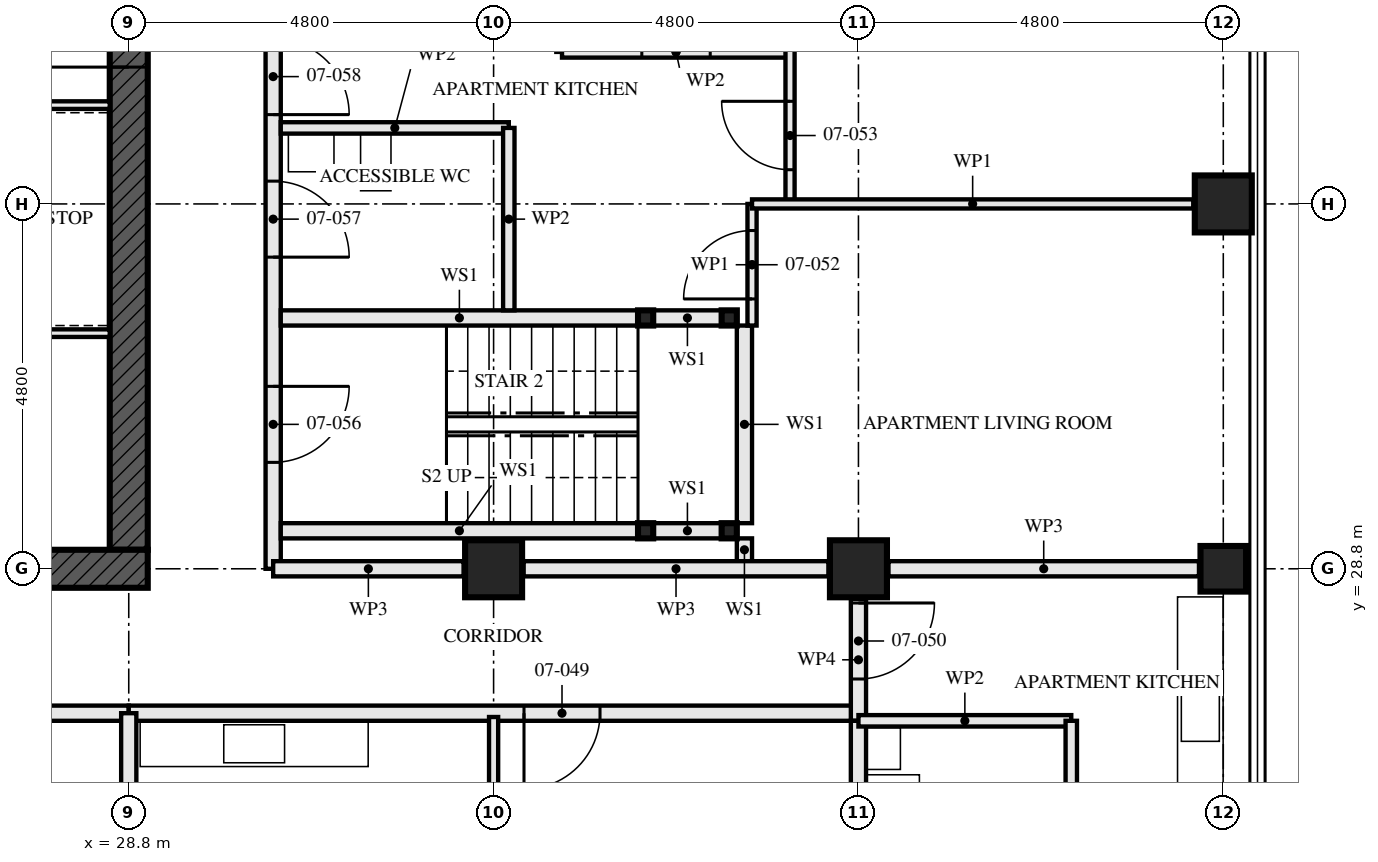
"""IFC4 building model, lengths in metres.
Left out: names, types, materials, properties, quantities, classifications, styles, units other than length and angle.
Written with IfcOpenShell. Run it as: python <this file> out.ifc"""

import sys

from ifc_helpers import new_model, si_unit, direction, frame, frame_2d, origin, origin_2d, place, context, subcontext, project, spatial, rectangle, hollow_rectangle, extrude, element, fill, save


model = new_model("IFC4")
c1 = context("Model", 3, precision=1e-05, world=origin(), true_north=direction((0.0, 1.0)))
c2 = subcontext(c1, "Body", "Model", "MODEL_VIEW")
j1 = project(units=[si_unit("LENGTHUNIT", "METRE"), si_unit("PLANEANGLEUNIT", "RADIAN")], contexts=[c1])
p1 = place(None, origin())
s1 = spatial("IfcSite", under=j1, at=p1, CompositionType="ELEMENT")
p2 = place(p1, origin())
s2 = spatial("IfcBuilding", under=s1, at=p2, CompositionType="ELEMENT")
p3 = place(p2, frame((0.0, 0.0, 30.5)))
s3 = spatial("IfcBuildingStorey", under=s2, at=p3, CompositionType="ELEMENT", Elevation=30.5)
for number, where, z_axis, x_axis in (
    (1, (33.6, 28.8, 0.0), (0.0, 0.0, 1.0), (0.0, 1.0, 0.0)),
    (2, (38.4, 28.8, 0.0), (0.0, 0.0, 1.0), (0.0, 1.0, 0.0)),
):
    element("IfcColumn", number, at=place(p3, frame(where, z_axis=z_axis, x_axis=x_axis)), inside=s3, PredefinedType="COLUMN", context=c2, shape_type="SweptSolid", body=[
        extrude(hollow_rectangle(XDim=0.75, YDim=0.75, WallThickness=0.08, at=origin_2d()), origin(), (0.0, 0.0, 1.0), 3.5),
    ])
p4 = place(p3, frame((43.2, 28.8, 0.0), z_axis=(0.0, 0.0, 1.0), x_axis=(0.0, 1.0, 0.0)))
e3 = element("IfcColumn", 3, at=p4, inside=s3, PredefinedType="COLUMN", context=c2, shape_type="SweptSolid", body=[
    extrude(hollow_rectangle(XDim=0.6, YDim=0.6, WallThickness=0.08, at=origin_2d()), origin(), (0.0, 0.0, 1.0), 3.5),
])
p5 = place(p3, frame((43.2, 33.6, 0.0), z_axis=(0.0, 0.0, 1.0), x_axis=(1.0, 0.0, 0.0)))
e4 = element("IfcColumn", 4, at=p5, inside=s3, PredefinedType="COLUMN", context=c2, shape_type="SweptSolid", body=[
    extrude(hollow_rectangle(XDim=0.75, YDim=0.75, WallThickness=0.08, at=origin_2d()), origin(), (0.0, 0.0, 1.0), 3.5),
])
p6 = place(p3, frame((14.15, 28.8, -0.17), z_axis=(0.0, 0.0, 1.0), x_axis=(1.0, 0.0, 0.0)))
e5 = element("IfcWall", 5, at=p6, inside=s3, PredefinedType="SHEAR", context=c2, shape_type="SweptSolid", body=[
    extrude(rectangle(XDim=14.9, YDim=0.5, at=frame_2d((7.45, 0.0))), origin(), (0.0, 0.0, 1.0), 3.5),
])
p7 = place(p6, frame((6.85, 0.0, 0.17)))
e6 = element("IfcOpeningElement", 6, at=p7, cuts=e5, PredefinedType="OPENING", context=c2, shape_type="SweptSolid", body=[
    extrude(rectangle(XDim=1.2, YDim=2.1, at=frame_2d((0.6, 1.05))), frame((0.0, 0.26, 0.0), z_axis=(0.0, -1.0, 0.0), x_axis=(1.0, 0.0, 0.0)), (0.0, 0.0, 1.0), 0.521),
])
p8 = place(p3, frame((28.8, 29.05, -0.17), z_axis=(0.0, 0.0, 1.0), x_axis=(0.0, 1.0, 0.0)))
e7 = element("IfcWall", 7, at=p8, inside=s3, PredefinedType="SHEAR", context=c2, shape_type="SweptSolid", body=[
    extrude(rectangle(XDim=13.9, YDim=0.5, at=frame_2d((6.95, 0.0))), origin(), (0.0, 0.0, 1.0), 3.5),
])
p9 = place(p8, frame((6.35, 0.0, 0.17)))
e8 = element("IfcOpeningElement", 8, at=p9, cuts=e7, PredefinedType="OPENING", context=c2, shape_type="SweptSolid", body=[
    extrude(rectangle(XDim=1.2, YDim=2.1, at=frame_2d((0.6, 1.05))), frame((0.0, 0.26, 0.0), z_axis=(0.0, -1.0, 0.0), x_axis=(1.0, 0.0, 0.0)), (0.0, 0.0, 1.0), 0.521),
])
for number, where, z_axis, x_axis in (
    (9, (36.7, 29.3, 0.0), (0.0, 0.0, 1.0), (1.0, 0.0, 0.0)),
    (10, (36.7, 32.1, 0.0), (0.0, 0.0, 1.0), (1.0, 0.0, 0.0)),
    (11, (35.6, 29.3, 0.0), (0.0, 0.0, 1.0), (1.0, 0.0, 0.0)),
    (12, (35.6, 32.1, 0.0), (0.0, 0.0, 1.0), (1.0, 0.0, 0.0)),
):
    element("IfcColumn", number, at=place(p3, frame(where, z_axis=z_axis, x_axis=x_axis)), inside=s3, PredefinedType="COLUMN", context=c2, shape_type="SweptSolid", body=[
        extrude(hollow_rectangle(XDim=0.2, YDim=0.2, WallThickness=0.008, at=origin_2d()), origin(), (0.0, 0.0, 1.0), 3.33),
    ])
p10 = place(p3, frame((14.4, 26.9, 0.0), z_axis=(0.0, 0.0, 1.0), x_axis=(1.0, 0.0, 0.0)))
e13 = element("IfcWall", 13, at=p10, inside=s3, PredefinedType="PARTITIONING", context=c2, shape_type="SweptSolid", body=[
    extrude(rectangle(XDim=14.4, YDim=0.2, at=frame_2d((7.2, 0.0))), origin(), (0.0, 0.0, 1.0), 2.55),
])
p11 = place(p10, frame((1.4, 0.0, 0.0)))
e14 = element("IfcOpeningElement", 14, at=p11, cuts=e13, PredefinedType="OPENING", context=c2, shape_type="SweptSolid", body=[
    extrude(rectangle(XDim=1.0, YDim=2.1, at=frame_2d((0.5, 1.05))), frame((0.0, 0.111, 0.0), z_axis=(0.0, -1.0, 0.0), x_axis=(1.0, 0.0, 0.0)), (0.0, 0.0, 1.0), 0.221),
])
p12 = place(p10, frame((5.2, 0.0, 0.0)))
e15 = element("IfcOpeningElement", 15, at=p12, cuts=e13, PredefinedType="OPENING", context=c2, shape_type="SweptSolid", body=[
    extrude(rectangle(XDim=1.0, YDim=2.1, at=frame_2d((0.5, 1.05))), frame((0.0, 0.111, 0.0), z_axis=(0.0, -1.0, 0.0), x_axis=(1.0, 0.0, 0.0)), (0.0, 0.0, 1.0), 0.221),
])
p13 = place(p10, frame((10.0, 0.0, 0.0)))
e16 = element("IfcOpeningElement", 16, at=p13, cuts=e13, PredefinedType="OPENING", context=c2, shape_type="SweptSolid", body=[
    extrude(rectangle(XDim=1.0, YDim=2.1, at=frame_2d((0.5, 1.05))), frame((0.0, 0.111, 0.0), z_axis=(0.0, -1.0, 0.0), x_axis=(1.0, 0.0, 0.0)), (0.0, 0.0, 1.0), 0.221),
])
p14 = place(p3, frame((33.6, 20.1, 0.0), z_axis=(0.0, 0.0, 1.0), x_axis=(0.0, 1.0, 0.0)))
e17 = element("IfcWall", 17, at=p14, inside=s3, PredefinedType="PARTITIONING", context=c2, shape_type="SweptSolid", body=[
    extrude(rectangle(XDim=6.75, YDim=0.12, at=frame_2d((3.375, 0.0))), origin(), (0.0, 0.0, 1.0), 2.55),
])
p15 = place(p14, frame((2.925, 0.0, 0.0)))
e18 = element("IfcOpeningElement", 18, at=p15, cuts=e17, PredefinedType="OPENING", context=c2, shape_type="SweptSolid", body=[
    extrude(rectangle(XDim=0.9, YDim=2.1, at=frame_2d((0.45, 1.05))), frame((0.0, 0.071, 0.0), z_axis=(0.0, -1.0, 0.0), x_axis=(1.0, 0.0, 0.0)), (0.0, 0.0, 1.0), 0.141),
])
p16 = place(p3, frame((38.4, 19.52, 0.0), z_axis=(0.0, 0.0, 1.0), x_axis=(0.0, 1.0, 0.0)))
e19 = element("IfcWall", 19, at=p16, inside=s3, PredefinedType="PARTITIONING", context=c2, shape_type="SweptSolid", body=[
    extrude(rectangle(XDim=7.28, YDim=0.2, at=frame_2d((3.64, 0.0))), origin(), (0.0, 0.0, 1.0), 2.55),
])
p17 = place(p3, frame((41.2, 23.8, 0.0), z_axis=(0.0, 0.0, 1.0), x_axis=(0.0, 1.0, 0.0)))
e20 = element("IfcWall", 20, at=p17, inside=s3, PredefinedType="PARTITIONING", context=c2, shape_type="SweptSolid", body=[
    extrude(rectangle(XDim=3.0, YDim=0.15, at=frame_2d((1.5, 0.0))), origin(), (0.0, 0.0, 1.0), 2.55),
])
p18 = place(p17, frame((1.05, 0.0, 0.0)))
e21 = element("IfcOpeningElement", 21, at=p18, cuts=e20, PredefinedType="OPENING", context=c2, shape_type="SweptSolid", body=[
    extrude(rectangle(XDim=0.9, YDim=2.1, at=frame_2d((0.45, 1.05))), frame((0.0, 0.085, 0.0), z_axis=(0.0, -1.0, 0.0), x_axis=(1.0, 0.0, 0.0)), (0.0, 0.0, 1.0), 0.171),
])
p19 = place(p3, frame((38.4, 26.8, 0.0), z_axis=(0.0, 0.0, 1.0), x_axis=(1.0, 0.0, 0.0)))
e22 = element("IfcWall", 22, at=p19, inside=s3, PredefinedType="PARTITIONING", context=c2, shape_type="SweptSolid", body=[
    extrude(rectangle(XDim=2.8, YDim=0.15, at=frame_2d((1.4, 0.0))), origin(), (0.0, 0.0, 1.0), 3.33),
])
p20 = place(p3, frame((28.8, 26.9, 0.0), z_axis=(0.0, 0.0, 1.0), x_axis=(1.0, 0.0, 0.0)))
e23 = element("IfcWall", 23, at=p20, inside=s3, PredefinedType="PARTITIONING", context=c2, shape_type="SweptSolid", body=[
    extrude(rectangle(XDim=9.6, YDim=0.2, at=frame_2d((4.8, 0.0))), origin(), (0.0, 0.0, 1.0), 3.33),
])
p21 = place(p20, frame((5.2, 0.0, 0.0)))
e24 = element("IfcOpeningElement", 24, at=p21, cuts=e23, PredefinedType="OPENING", context=c2, shape_type="SweptSolid", body=[
    extrude(rectangle(XDim=1.0, YDim=2.1, at=frame_2d((0.5, 1.05))), frame((0.0, 0.111, 0.0), z_axis=(0.0, -1.0, 0.0), x_axis=(1.0, 0.0, 0.0)), (0.0, 0.0, 1.0), 0.221),
])
p22 = place(p3, frame((38.4, 26.8, 0.0), z_axis=(0.0, 0.0, 1.0), x_axis=(0.0, 1.0, 0.0)))
e25 = element("IfcWall", 25, at=p22, inside=s3, PredefinedType="PARTITIONING", context=c2, shape_type="SweptSolid", body=[
    extrude(rectangle(XDim=1.605, YDim=0.2, at=frame_2d((0.802, 0.0))), origin(), (0.0, 0.0, 1.0), 3.33),
])
p23 = place(p22, frame((0.55, 0.0, 0.0)))
e26 = element("IfcOpeningElement", 26, at=p23, cuts=e25, PredefinedType="OPENING", context=c2, shape_type="SweptSolid", body=[
    extrude(rectangle(XDim=1.0, YDim=2.1, at=frame_2d((0.5, 1.05))), frame((0.0, 0.111, 0.0), z_axis=(0.0, -1.0, 0.0), x_axis=(1.0, 0.0, 0.0)), (0.0, 0.0, 1.0), 0.221),
])
p24 = place(p3, frame((36.6, 29.3, 0.0), z_axis=(0.0, 0.0, 1.0), x_axis=(-1.0, 0.0, 0.0)))
e27 = element("IfcWall", 27, at=p24, inside=s3, PredefinedType="SOLIDWALL", context=c2, shape_type="SweptSolid", body=[
    extrude(rectangle(XDim=0.9, YDim=0.2, at=frame_2d((0.45, 0.0))), origin(), (0.0, 0.0, 1.0), 2.99),
])
p25 = place(p3, frame((35.5, 29.3, 0.0), z_axis=(0.0, 0.0, 1.0), x_axis=(-1.0, 0.0, 0.0)))
e28 = element("IfcWall", 28, at=p25, inside=s3, PredefinedType="SOLIDWALL", context=c2, shape_type="SweptSolid", body=[
    extrude(rectangle(XDim=4.7, YDim=0.2, at=frame_2d((2.35, 0.0))), origin(), (0.0, 0.0, 1.0), 2.99),
])
p26 = place(p3, frame((36.6, 32.1, 0.0), z_axis=(0.0, 0.0, 1.0), x_axis=(-1.0, 0.0, 0.0)))
e29 = element("IfcWall", 29, at=p26, inside=s3, PredefinedType="SOLIDWALL", context=c2, shape_type="SweptSolid", body=[
    extrude(rectangle(XDim=0.9, YDim=0.2, at=frame_2d((0.45, 0.0))), origin(), (0.0, 0.0, 1.0), 2.99),
])
p27 = place(p3, frame((35.5, 32.1, 0.0), z_axis=(0.0, 0.0, 1.0), x_axis=(-1.0, 0.0, 0.0)))
e30 = element("IfcWall", 30, at=p27, inside=s3, PredefinedType="SOLIDWALL", context=c2, shape_type="SweptSolid", body=[
    extrude(rectangle(XDim=4.7, YDim=0.2, at=frame_2d((2.35, 0.0))), origin(), (0.0, 0.0, 1.0), 2.99),
])
p28 = place(p3, frame((36.9, 28.9, 0.0), z_axis=(0.0, 0.0, 1.0), x_axis=(0.0, 1.0, 0.0)))
e31 = element("IfcWall", 31, at=p28, inside=s3, PredefinedType="SOLIDWALL", context=c2, shape_type="SweptSolid", body=[
    extrude(rectangle(XDim=0.3, YDim=0.2, at=frame_2d((0.15, 0.0))), origin(), (0.0, 0.0, 1.0), 3.33),
])
p29 = place(p3, frame((36.9, 29.4, 0.0), z_axis=(0.0, 0.0, 1.0), x_axis=(0.0, 1.0, 0.0)))
e32 = element("IfcWall", 32, at=p29, inside=s3, PredefinedType="SOLIDWALL", context=c2, shape_type="SweptSolid", body=[
    extrude(rectangle(XDim=2.6, YDim=0.2, at=frame_2d((1.3, 0.0))), origin(), (0.0, 0.0, 1.0), 3.33),
])
p30 = place(p3, frame((33.8, 32.2, 0.0), z_axis=(0.0, 0.0, 1.0), x_axis=(0.0, 1.0, 0.0)))
e33 = element("IfcWall", 33, at=p30, inside=s3, PredefinedType="PARTITIONING", context=c2, shape_type="SweptSolid", body=[
    extrude(rectangle(XDim=2.4, YDim=0.15, at=frame_2d((1.2, 0.0))), origin(), (0.0, 0.0, 1.0), 2.55),
])
p31 = place(p3, frame((33.8, 34.6, 0.0), z_axis=(0.0, 0.0, 1.0), x_axis=(-1.0, 0.0, 0.0)))
e34 = element("IfcWall", 34, at=p31, inside=s3, PredefinedType="PARTITIONING", context=c2, shape_type="SweptSolid", body=[
    extrude(rectangle(XDim=3.0, YDim=0.15, at=frame_2d((1.5, 0.0))), origin(), (0.0, 0.0, 1.0), 3.33),
])
p32 = place(p3, frame((37.5, 35.6, 0.0), z_axis=(0.0, 0.0, 1.0), x_axis=(-1.0, 0.0, 0.0)))
e35 = element("IfcWall", 35, at=p32, inside=s3, PredefinedType="PARTITIONING", context=c2, shape_type="SweptSolid", body=[
    extrude(rectangle(XDim=3.0, YDim=0.15, at=frame_2d((1.5, 0.0))), origin(), (0.0, 0.0, 1.0), 3.33),
])
p33 = place(p32, frame((1.05, 0.0, 0.0)))
e36 = element("IfcOpeningElement", 36, at=p33, cuts=e35, PredefinedType="OPENING", context=c2, shape_type="SweptSolid", body=[
    extrude(rectangle(XDim=0.9, YDim=2.1, at=frame_2d((0.45, 1.05))), frame((0.0, 0.085, 0.0), z_axis=(0.0, -1.0, 0.0), x_axis=(1.0, 0.0, 0.0)), (0.0, 0.0, 1.0), 0.171),
])
p34 = place(p3, frame((37.0, 32.0, 0.0), z_axis=(0.0, 0.0, 1.0), x_axis=(0.0, 1.0, 0.0)))
e37 = element("IfcWall", 37, at=p34, inside=s3, PredefinedType="PARTITIONING", context=c2, shape_type="SweptSolid", body=[
    extrude(rectangle(XDim=1.6, YDim=0.12, at=frame_2d((0.8, 0.0))), origin(), (0.0, 0.0, 1.0), 3.33),
])
p35 = place(p34, frame((0.35, 0.0, 0.0)))
e38 = element("IfcOpeningElement", 38, at=p35, cuts=e37, PredefinedType="OPENING", context=c2, shape_type="SweptSolid", body=[
    extrude(rectangle(XDim=0.9, YDim=2.1, at=frame_2d((0.45, 1.05))), frame((0.0, 0.071, 0.0), z_axis=(0.0, -1.0, 0.0), x_axis=(1.0, 0.0, 0.0)), (0.0, 0.0, 1.0), 0.141),
])
p36 = place(p3, frame((37.5, 33.6, 0.0), z_axis=(0.0, 0.0, 1.0), x_axis=(0.0, 1.0, 0.0)))
e39 = element("IfcWall", 39, at=p36, inside=s3, PredefinedType="PARTITIONING", context=c2, shape_type="SweptSolid", body=[
    extrude(rectangle(XDim=4.8, YDim=0.12, at=frame_2d((2.4, 0.0))), origin(), (0.0, 0.0, 1.0), 3.33),
])
p37 = place(p36, frame((0.45, 0.0, 0.0)))
e40 = element("IfcOpeningElement", 40, at=p37, cuts=e39, PredefinedType="OPENING", context=c2, shape_type="SweptSolid", body=[
    extrude(rectangle(XDim=0.9, YDim=2.1, at=frame_2d((0.45, 1.05))), frame((0.0, 0.071, 0.0), z_axis=(0.0, -1.0, 0.0), x_axis=(1.0, 0.0, 0.0)), (0.0, 0.0, 1.0), 0.141),
])
p38 = place(p3, frame((42.805, 33.6, 0.0), z_axis=(0.0, 0.0, 1.0), x_axis=(-1.0, 0.0, 0.0)))
e41 = element("IfcWall", 41, at=p38, inside=s3, PredefinedType="PARTITIONING", context=c2, shape_type="SweptSolid", body=[
    extrude(rectangle(XDim=5.805, YDim=0.12, at=frame_2d((2.902, 0.0))), origin(), (0.0, 0.0, 1.0), 2.55),
])
p39 = place(p3, frame((30.7, 28.8, 0.0), z_axis=(0.0, 0.0, 1.0), x_axis=(0.0, 1.0, 0.0)))
e42 = element("IfcWall", 42, at=p39, inside=s3, PredefinedType="PARTITIONING", context=c2, shape_type="SweptSolid", body=[
    extrude(rectangle(XDim=14.4, YDim=0.2, at=frame_2d((7.2, 0.0))), origin(), (0.0, 0.0, 1.0), 2.55),
])
p40 = place(p39, frame((1.4, 0.0, 0.0)))
e43 = element("IfcOpeningElement", 43, at=p40, cuts=e42, PredefinedType="OPENING", context=c2, shape_type="SweptSolid", body=[
    extrude(rectangle(XDim=1.0, YDim=2.1, at=frame_2d((0.5, 1.05))), frame((0.0, 0.111, 0.0), z_axis=(0.0, -1.0, 0.0), x_axis=(1.0, 0.0, 0.0)), (0.0, 0.0, 1.0), 0.221),
])
p41 = place(p39, frame((4.1, 0.0, 0.0)))
e44 = element("IfcOpeningElement", 44, at=p41, cuts=e42, PredefinedType="OPENING", context=c2, shape_type="SweptSolid", body=[
    extrude(rectangle(XDim=1.0, YDim=2.1, at=frame_2d((0.5, 1.05))), frame((0.0, 0.111, 0.0), z_axis=(0.0, -1.0, 0.0), x_axis=(1.0, 0.0, 0.0)), (0.0, 0.0, 1.0), 0.221),
])
p42 = place(p39, frame((5.975, 0.0, 0.0)))
e45 = element("IfcOpeningElement", 45, at=p42, cuts=e42, PredefinedType="OPENING", context=c2, shape_type="SweptSolid", body=[
    extrude(rectangle(XDim=1.0, YDim=2.1, at=frame_2d((0.5, 1.05))), frame((0.0, 0.111, 0.0), z_axis=(0.0, -1.0, 0.0), x_axis=(1.0, 0.0, 0.0)), (0.0, 0.0, 1.0), 0.221),
])
p43 = place(p39, frame((10.0, 0.0, 0.0)))
e46 = element("IfcOpeningElement", 46, at=p43, cuts=e42, PredefinedType="OPENING", context=c2, shape_type="SweptSolid", body=[
    extrude(rectangle(XDim=1.0, YDim=2.1, at=frame_2d((0.5, 1.05))), frame((0.0, 0.111, 0.0), z_axis=(0.0, -1.0, 0.0), x_axis=(1.0, 0.0, 0.0)), (0.0, 0.0, 1.0), 0.221),
])
p44 = place(p3, frame((23.05, 34.9, 0.0), z_axis=(0.0, 0.0, 1.0), x_axis=(1.0, 0.0, 0.0)))
e47 = element("IfcWall", 47, at=p44, inside=s3, PredefinedType="SOLIDWALL", context=c2, shape_type="SweptSolid", body=[
    extrude(rectangle(XDim=5.5, YDim=0.1, at=frame_2d((2.75, 0.0))), origin(), (0.0, 0.0, 1.0), 3.33),
])
p45 = place(p3, frame((23.15, 31.9, 0.0), z_axis=(0.0, 0.0, 1.0), x_axis=(1.0, 0.0, 0.0)))
e48 = element("IfcWall", 48, at=p45, inside=s3, PredefinedType="SOLIDWALL", context=c2, shape_type="SweptSolid", body=[
    extrude(rectangle(XDim=5.4, YDim=0.1, at=frame_2d((2.7, 0.0))), origin(), (0.0, 0.0, 1.0), 3.33),
])
p46 = place(p3, frame((28.8, 24.395, 0.0), z_axis=(0.0, 0.0, 1.0), x_axis=(0.0, 1.0, 0.0)))
e49 = element("IfcWall", 49, at=p46, inside=s3, PredefinedType="PARTITIONING", context=c2, shape_type="SweptSolid", body=[
    extrude(rectangle(XDim=2.505, YDim=0.2, at=frame_2d((1.252, 0.0))), origin(), (0.0, 0.0, 1.0), 2.32),
])
p47 = place(p3, frame((42.88, 28.8, 0.0), z_axis=(0.0, 0.0, 1.0), x_axis=(-1.0, 0.0, 0.0)))
e50 = element("IfcWall", 50, at=p47, inside=s3, PredefinedType="PARTITIONING", context=c2, shape_type="SweptSolid", body=[
    extrude(rectangle(XDim=4.085, YDim=0.2, at=frame_2d((2.042, 0.0))), origin(), (0.0, 0.0, 1.0), 2.32),
])
p48 = place(p3, frame((38.005, 28.8, 0.0), z_axis=(0.0, 0.0, 1.0), x_axis=(-1.0, 0.0, 0.0)))
e51 = element("IfcWall", 51, at=p48, inside=s3, PredefinedType="PARTITIONING", context=c2, shape_type="SweptSolid", body=[
    extrude(rectangle(XDim=4.01, YDim=0.2, at=frame_2d((2.005, 0.0))), origin(), (0.0, 0.0, 1.0), 2.32),
])
p49 = place(p3, frame((33.205, 28.8, 0.0), z_axis=(0.0, 0.0, 1.0), x_axis=(-1.0, 0.0, 0.0)))
e52 = element("IfcWall", 52, at=p49, inside=s3, PredefinedType="PARTITIONING", context=c2, shape_type="SweptSolid", body=[
    extrude(rectangle(XDim=2.505, YDim=0.2, at=frame_2d((1.252, 0.0))), origin(), (0.0, 0.0, 1.0), 2.32),
])
p50 = place(p21, frame((1.0, 0.0, 0.0), z_axis=(0.0, 0.0, 1.0), x_axis=(-1.0, 0.0, 0.0)))
e53 = element("IfcDoor", 53, at=p50, inside=s3, OperationType="SINGLE_SWING_LEFT", PredefinedType="DOOR", context=c2, shape_type="SweptSolid", body=[
    extrude(rectangle(XDim=1.0, YDim=2.1, at=frame_2d((0.5, 1.05))), frame((0.0, 0.027, 0.0), z_axis=(0.0, -1.0, 0.0), x_axis=(1.0, 0.0, 0.0)), (0.0, 0.0, 1.0), 0.054),
])
fill(e24, e53)
p51 = place(p23, frame((1.0, 0.0, 0.0), z_axis=(0.0, 0.0, 1.0), x_axis=(-1.0, 0.0, 0.0)))
e54 = element("IfcDoor", 54, at=p51, inside=s3, OperationType="SINGLE_SWING_RIGHT", PredefinedType="DOOR", context=c2, shape_type="SweptSolid", body=[
    extrude(rectangle(XDim=1.0, YDim=2.1, at=frame_2d((0.5, 1.05))), frame((0.0, 0.027, 0.0), z_axis=(0.0, -1.0, 0.0), x_axis=(1.0, 0.0, 0.0)), (0.0, 0.0, 1.0), 0.054),
])
fill(e26, e54)
p52 = place(p33, frame((0.9, 0.0, 0.0), z_axis=(0.0, 0.0, 1.0), x_axis=(-1.0, 0.0, 0.0)))
e55 = element("IfcDoor", 55, at=p52, inside=s3, OperationType="SINGLE_SWING_RIGHT", PredefinedType="DOOR", context=c2, shape_type="SweptSolid", body=[
    extrude(rectangle(XDim=0.9, YDim=2.1, at=frame_2d((0.45, 1.05))), frame((0.0, 0.022, 0.0), z_axis=(0.0, -1.0, 0.0), x_axis=(1.0, 0.0, 0.0)), (0.0, 0.0, 1.0), 0.044),
])
fill(e36, e55)
p53 = place(p35, origin())
e56 = element("IfcDoor", 56, at=p53, inside=s3, OperationType="SINGLE_SWING_RIGHT", PredefinedType="DOOR", context=c2, shape_type="SweptSolid", body=[
    extrude(rectangle(XDim=0.9, YDim=2.1, at=frame_2d((0.45, 1.05))), frame((0.0, 0.022, 0.0), z_axis=(0.0, -1.0, 0.0), x_axis=(1.0, 0.0, 0.0)), (0.0, 0.0, 1.0), 0.044),
])
fill(e38, e56)
p54 = place(p37, origin())
e57 = element("IfcDoor", 57, at=p54, inside=s3, OperationType="SINGLE_SWING_LEFT", PredefinedType="DOOR", context=c2, shape_type="SweptSolid", body=[
    extrude(rectangle(XDim=0.9, YDim=2.1, at=frame_2d((0.45, 1.05))), frame((0.0, 0.022, 0.0), z_axis=(0.0, -1.0, 0.0), x_axis=(1.0, 0.0, 0.0)), (0.0, 0.0, 1.0), 0.044),
])
fill(e40, e57)
p55 = place(p40, frame((1.0, 0.0, 0.0), z_axis=(0.0, 0.0, 1.0), x_axis=(-1.0, 0.0, 0.0)))
e58 = element("IfcDoor", 58, at=p55, inside=s3, OperationType="SINGLE_SWING_RIGHT", PredefinedType="DOOR", context=c2, shape_type="SweptSolid", body=[
    extrude(rectangle(XDim=1.0, YDim=2.1, at=frame_2d((0.5, 1.05))), frame((0.0, 0.032, 0.0), z_axis=(0.0, -1.0, 0.0), x_axis=(1.0, 0.0, 0.0)), (0.0, 0.0, 1.0), 0.064),
])
fill(e43, e58)
p56 = place(p41, frame((1.0, 0.0, 0.0), z_axis=(0.0, 0.0, 1.0), x_axis=(-1.0, 0.0, 0.0)))
e59 = element("IfcDoor", 59, at=p56, inside=s3, OperationType="SINGLE_SWING_LEFT", PredefinedType="DOOR", context=c2, shape_type="SweptSolid", body=[
    extrude(rectangle(XDim=1.0, YDim=2.1, at=frame_2d((0.5, 1.05))), frame((0.0, 0.027, 0.0), z_axis=(0.0, -1.0, 0.0), x_axis=(1.0, 0.0, 0.0)), (0.0, 0.0, 1.0), 0.054),
])
fill(e44, e59)
p57 = place(p42, frame((1.0, 0.0, 0.0), z_axis=(0.0, 0.0, 1.0), x_axis=(-1.0, 0.0, 0.0)))
e60 = element("IfcDoor", 60, at=p57, inside=s3, OperationType="SINGLE_SWING_LEFT", PredefinedType="DOOR", context=c2, shape_type="SweptSolid", body=[
    extrude(rectangle(XDim=1.0, YDim=2.1, at=frame_2d((0.5, 1.05))), frame((0.0, 0.027, 0.0), z_axis=(0.0, -1.0, 0.0), x_axis=(1.0, 0.0, 0.0)), (0.0, 0.0, 1.0), 0.054),
])
fill(e45, e60)
p58 = place(p9, origin())
e61 = element("IfcDoor", 61, at=p58, inside=s3, OperationType="SINGLE_SWING_LEFT", PredefinedType="DOOR", context=c2, shape_type="SweptSolid", body=[
    extrude(rectangle(XDim=1.2, YDim=2.1, at=frame_2d((0.6, 1.05))), frame((0.0, 0.027, 0.0), z_axis=(0.0, -1.0, 0.0), x_axis=(1.0, 0.0, 0.0)), (0.0, 0.0, 1.0), 0.054),
])
fill(e8, e61)
save(model, sys.argv[1])
